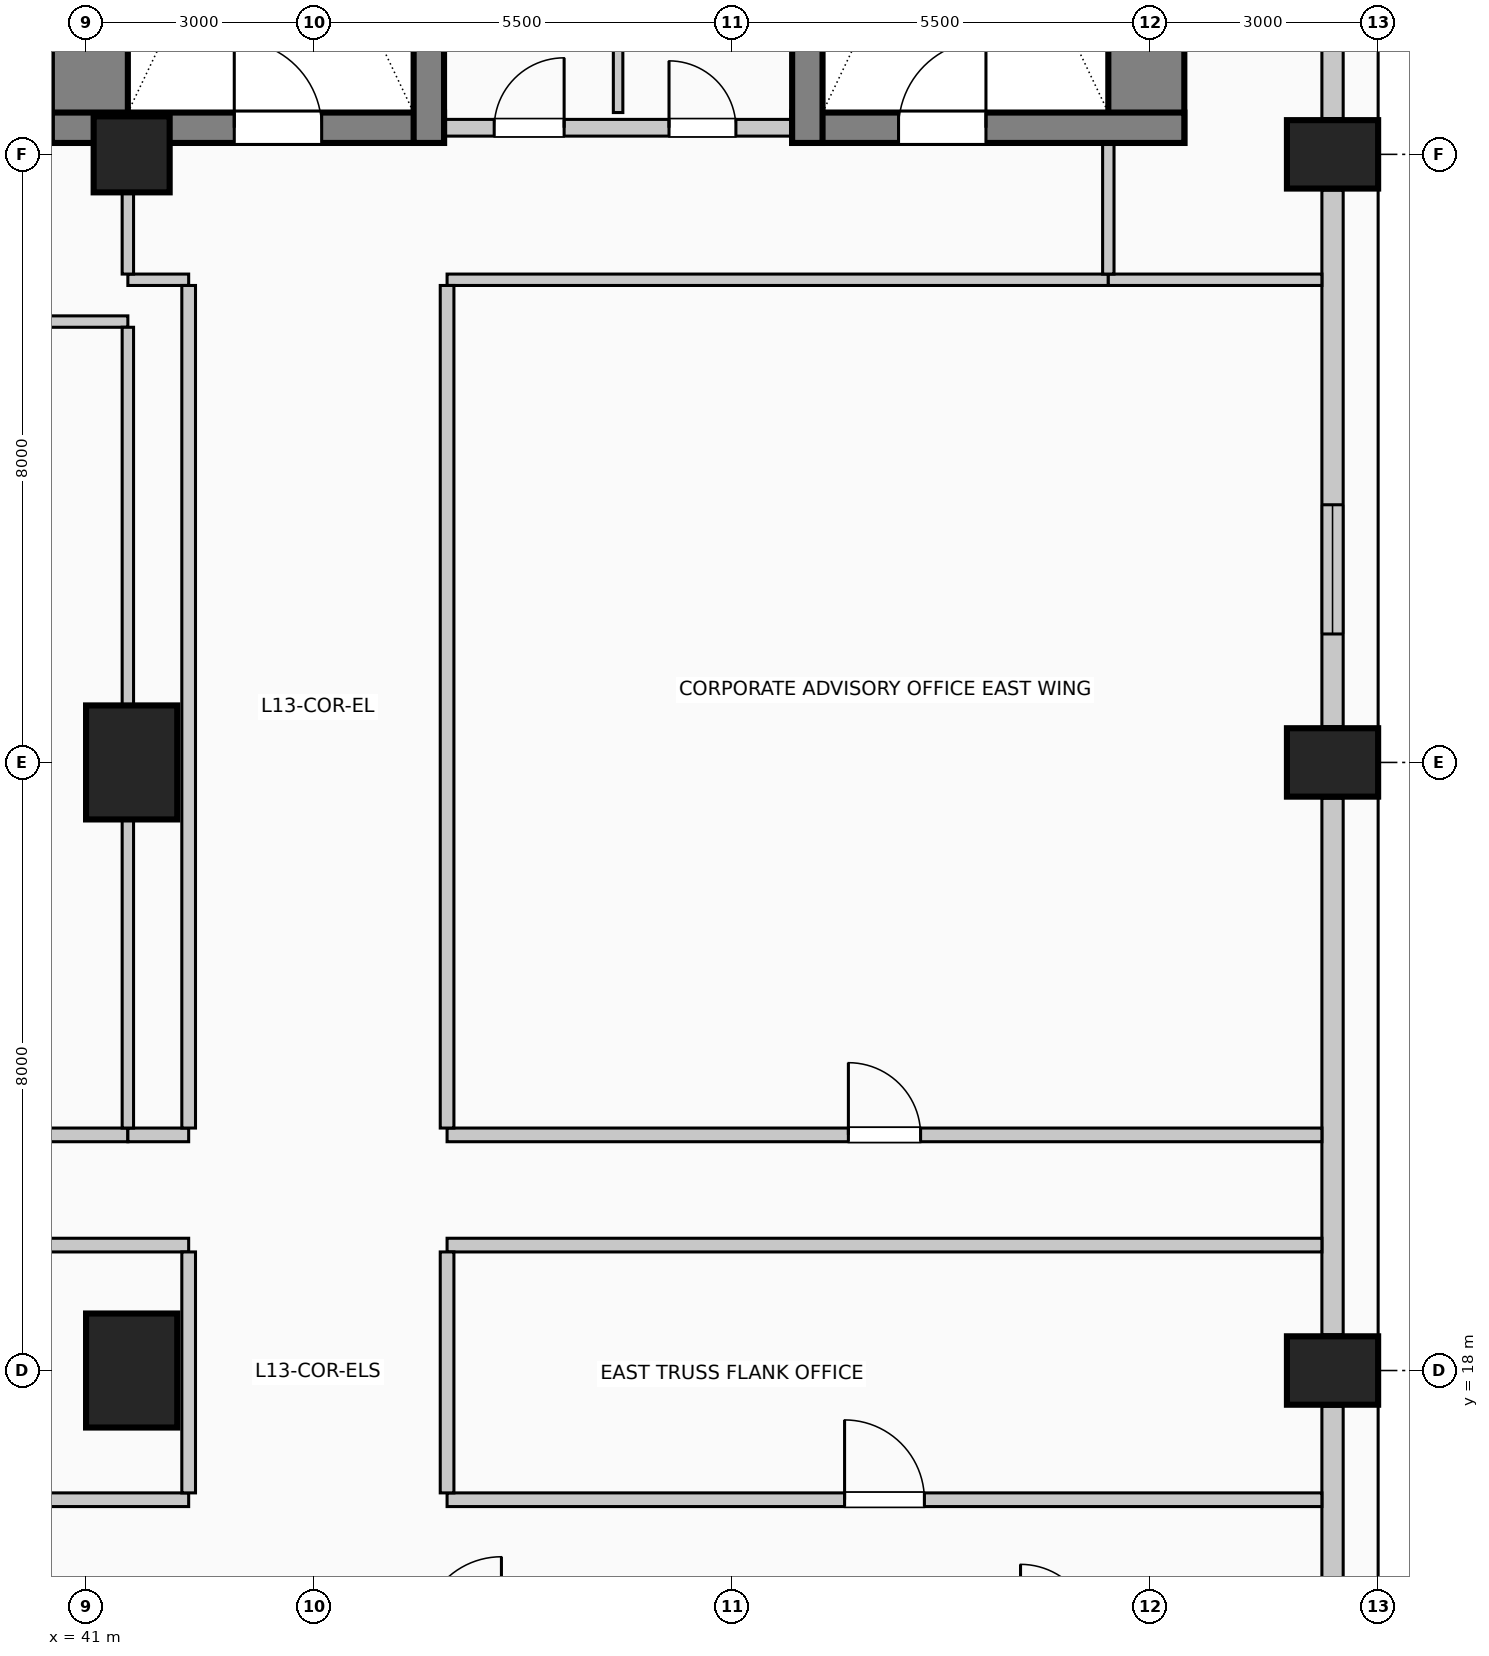
"""IFC4 building model, lengths in metres.
Left out: names, types, materials, properties, quantities, classifications, styles, units other than length and angle.
Written with IfcOpenShell. Run it as: python <this file> out.ifc"""

import sys

from ifc_helpers import new_model, si_unit, direction, frame, frame_2d, origin, origin_2d, place, context, subcontext, project, spatial, rectangle, circle, extrude, element, fill, save


model = new_model("IFC4")
c1 = context("Model", 3, precision=1e-05, world=origin(), true_north=direction((0.0, 1.0)))
c2 = subcontext(c1, "Body", "Model", "MODEL_VIEW")
j1 = project(units=[si_unit("LENGTHUNIT", "METRE"), si_unit("PLANEANGLEUNIT", "RADIAN")], contexts=[c1])
p1 = place(None, origin())
s1 = spatial("IfcSite", under=j1, at=p1, CompositionType="ELEMENT")
p2 = place(p1, origin())
s2 = spatial("IfcBuilding", under=s1, at=p2, CompositionType="ELEMENT")
p3 = place(p2, frame((0.0, 0.0, 54.6)))
s3 = spatial("IfcBuildingStorey", under=s2, at=p3, CompositionType="ELEMENT", Elevation=54.6)
for number, where, z_axis, x_axis in (
    (1, (41.05, 34.15, 0.0), (0.0, 0.0, 1.0), (0.0, 1.0, 0.0)),
    (2, (54.95, 34.15, 0.0), (0.0, 0.0, 1.0), (0.0, 1.0, 0.0)),
):
    element("IfcWall", number, at=place(p3, frame(where, z_axis=z_axis, x_axis=x_axis)), inside=s3, PredefinedType="SHEAR", context=c2, shape_type="SweptSolid", body=[
        extrude(rectangle(XDim=9.28, YDim=1.0, at=frame_2d((4.64, 0.0))), origin(), (0.0, 0.0, 1.0), 4.0),
    ])
p4 = place(p3, frame((40.55, 34.35, 0.0), z_axis=(0.0, 0.0, 1.0), x_axis=(1.0, 0.0, 0.0)))
e3 = element("IfcWall", 3, at=p4, inside=s3, PredefinedType="SHEAR", context=c2, shape_type="SweptSolid", body=[
    extrude(rectangle(XDim=5.16, YDim=0.4, at=frame_2d((2.58, 0.0))), origin(), (0.0, 0.0, 1.0), 4.0),
])
p5 = place(p4, frame((2.4, 0.0, 0.0)))
e4 = element("IfcOpeningElement", 4, at=p5, cuts=e3, PredefinedType="OPENING", context=c2, shape_type="SweptSolid", body=[
    extrude(rectangle(XDim=1.15, YDim=2.2, at=frame_2d((0.575, 1.1))), frame((0.0, 0.21, 0.0), z_axis=(0.0, -1.0, 0.0), x_axis=(1.0, 0.0, 0.0)), (0.0, 0.0, 1.0), 0.42),
])
p6 = place(p3, frame((45.51, 34.15, 0.0), z_axis=(0.0, 0.0, 1.0), x_axis=(0.0, 1.0, 0.0)))
e5 = element("IfcWall", 5, at=p6, inside=s3, PredefinedType="SHEAR", context=c2, shape_type="SweptSolid", body=[
    extrude(rectangle(XDim=9.28, YDim=0.4, at=frame_2d((4.64, 0.0))), origin(), (0.0, 0.0, 1.0), 4.0),
])
p7 = place(p3, frame((50.29, 34.35, 0.0), z_axis=(0.0, 0.0, 1.0), x_axis=(1.0, 0.0, 0.0)))
e6 = element("IfcWall", 6, at=p7, inside=s3, PredefinedType="SHEAR", context=c2, shape_type="SweptSolid", body=[
    extrude(rectangle(XDim=5.16, YDim=0.4, at=frame_2d((2.58, 0.0))), origin(), (0.0, 0.0, 1.0), 4.0),
])
p8 = place(p7, frame((1.4, 0.0, 0.0)))
e7 = element("IfcOpeningElement", 7, at=p8, cuts=e6, PredefinedType="OPENING", context=c2, shape_type="SweptSolid", body=[
    extrude(rectangle(XDim=1.15, YDim=2.2, at=frame_2d((0.575, 1.1))), frame((0.0, 0.21, 0.0), z_axis=(0.0, -1.0, 0.0), x_axis=(1.0, 0.0, 0.0)), (0.0, 0.0, 1.0), 0.42),
])
p9 = place(p3, frame((50.49, 34.15, 0.0), z_axis=(0.0, 0.0, 1.0), x_axis=(0.0, 1.0, 0.0)))
e8 = element("IfcWall", 8, at=p9, inside=s3, PredefinedType="SHEAR", context=c2, shape_type="SweptSolid", body=[
    extrude(rectangle(XDim=9.28, YDim=0.4, at=frame_2d((4.64, 0.0))), origin(), (0.0, 0.0, 1.0), 4.0),
])
for number, where, z_axis, x_axis in (
    (9, (57.4, 18.0, 0.0), (0.0, 0.0, 1.0), (0.0, 1.0, 0.0)),
    (10, (57.4, 26.0, 0.0), (0.0, 0.0, 1.0), (0.0, 1.0, 0.0)),
    (11, (57.4, 34.0, 0.0), (0.0, 0.0, 1.0), (0.0, 1.0, 0.0)),
):
    element("IfcColumn", number, at=place(p3, frame(where, z_axis=z_axis, x_axis=x_axis)), inside=s3, PredefinedType="COLUMN", context=c2, shape_type="SweptSolid", body=[
        extrude(rectangle(XDim=0.9, YDim=1.2, at=origin_2d()), origin(), (0.0, 0.0, 1.0), 4.0),
    ])
for number, where, z_axis, x_axis in (
    (12, (41.6, 18.0, 0.0), (0.0, 0.0, 1.0), (1.0, 0.0, 0.0)),
    (13, (41.6, 26.0, 0.0), (0.0, 0.0, 1.0), (1.0, 0.0, 0.0)),
):
    element("IfcColumn", number, at=place(p3, frame(where, z_axis=z_axis, x_axis=x_axis)), inside=s3, PredefinedType="COLUMN", context=c2, shape_type="SweptSolid", body=[
        extrude(rectangle(XDim=1.2, YDim=1.5, at=origin_2d()), origin(), (0.0, 0.0, 1.0), 4.0),
    ])
p10 = place(p3, frame((41.6, 34.0, 0.0), z_axis=(0.0, 0.0, 1.0), x_axis=(1.0, 0.0, 0.0)))
e14 = element("IfcColumn", 14, at=p10, inside=s3, PredefinedType="COLUMN", context=c2, shape_type="SweptSolid", body=[
    extrude(circle(Radius=0.5, at=origin_2d()), origin(), (0.0, 0.0, 1.0), 4.0),
])
p11 = place(p3, frame((57.4, 17.53, 0.0), z_axis=(0.0, 0.0, 1.0), x_axis=(0.0, -1.0, 0.0)))
e15 = element("IfcWall", 15, at=p11, inside=s3, PredefinedType="SOLIDWALL", context=c2, shape_type="SweptSolid", body=[
    extrude(rectangle(XDim=7.06, YDim=0.28, at=frame_2d((3.53, 0.0))), origin(), (0.0, 0.0, 1.0), 2.85),
])
p12 = place(p11, frame((4.14, 0.0, 0.5)))
e16 = element("IfcOpeningElement", 16, at=p12, cuts=e15, PredefinedType="OPENING", context=c2, shape_type="SweptSolid", body=[
    extrude(rectangle(XDim=1.7, YDim=1.95, at=frame_2d((0.85, 0.975))), frame((0.0, 0.15, 0.0), z_axis=(0.0, -1.0, 0.0), x_axis=(1.0, 0.0, 0.0)), (0.0, 0.0, 1.0), 0.3),
])
p13 = place(p3, frame((57.4, 25.53, 0.0), z_axis=(0.0, 0.0, 1.0), x_axis=(0.0, -1.0, 0.0)))
e17 = element("IfcWall", 17, at=p13, inside=s3, PredefinedType="SOLIDWALL", context=c2, shape_type="SweptSolid", body=[
    extrude(rectangle(XDim=7.06, YDim=0.28, at=frame_2d((3.53, 0.0))), origin(), (0.0, 0.0, 1.0), 2.85),
])
p14 = place(p3, frame((57.4, 33.53, 0.0), z_axis=(0.0, 0.0, 1.0), x_axis=(0.0, -1.0, 0.0)))
e18 = element("IfcWall", 18, at=p14, inside=s3, PredefinedType="SOLIDWALL", context=c2, shape_type="SweptSolid", body=[
    extrude(rectangle(XDim=7.06, YDim=0.28, at=frame_2d((3.53, 0.0))), origin(), (0.0, 0.0, 1.0), 2.85),
])
p15 = place(p14, frame((4.14, 0.0, 0.5)))
e19 = element("IfcOpeningElement", 19, at=p15, cuts=e18, PredefinedType="OPENING", context=c2, shape_type="SweptSolid", body=[
    extrude(rectangle(XDim=1.7, YDim=1.95, at=frame_2d((0.85, 0.975))), frame((0.0, 0.15, 0.0), z_axis=(0.0, -1.0, 0.0), x_axis=(1.0, 0.0, 0.0)), (0.0, 0.0, 1.0), 0.3),
])
p16 = place(p3, frame((57.4, 41.93, 0.0), z_axis=(0.0, 0.0, 1.0), x_axis=(0.0, -1.0, 0.0)))
e20 = element("IfcWall", 20, at=p16, inside=s3, PredefinedType="SOLIDWALL", context=c2, shape_type="SweptSolid", body=[
    extrude(rectangle(XDim=7.46, YDim=0.28, at=frame_2d((3.73, 0.0))), origin(), (0.0, 0.0, 1.0), 2.85),
])
p17 = place(p3, frame((45.72, 34.35, 0.0), z_axis=(0.0, 0.0, 1.0), x_axis=(1.0, 0.0, 0.0)))
e21 = element("IfcWall", 21, at=p17, inside=s3, PredefinedType="PARTITIONING", context=c2, shape_type="SweptSolid", body=[
    extrude(rectangle(XDim=4.56, YDim=0.22, at=frame_2d((2.28, 0.0))), origin(), (0.0, 0.0, 1.0), 3.7),
])
p18 = place(p17, frame((0.65, 0.0, 0.0)))
e22 = element("IfcOpeningElement", 22, at=p18, cuts=e21, PredefinedType="OPENING", context=c2, shape_type="SweptSolid", body=[
    extrude(rectangle(XDim=0.92, YDim=2.1, at=frame_2d((0.46, 1.05))), frame((0.0, 0.12, 0.0), z_axis=(0.0, -1.0, 0.0), x_axis=(1.0, 0.0, 0.0)), (0.0, 0.0, 1.0), 0.24),
])
p19 = place(p17, frame((2.95, 0.0, 0.0)))
e23 = element("IfcOpeningElement", 23, at=p19, cuts=e21, PredefinedType="OPENING", context=c2, shape_type="SweptSolid", body=[
    extrude(rectangle(XDim=0.88, YDim=2.1, at=frame_2d((0.44, 1.05))), frame((0.0, 0.12, 0.0), z_axis=(0.0, -1.0, 0.0), x_axis=(1.0, 0.0, 0.0)), (0.0, 0.0, 1.0), 0.24),
])
p20 = place(p3, frame((15.65, 16.3, 0.0), z_axis=(0.0, 0.0, 1.0), x_axis=(1.0, 0.0, 0.0)))
e24 = element("IfcWall", 24, at=p20, inside=s3, PredefinedType="PARTITIONING", context=c2, shape_type="SweptSolid", body=[
    extrude(rectangle(XDim=26.7, YDim=0.18, at=frame_2d((13.35, 0.0))), origin(), (0.0, 0.0, 1.0), 3.7),
])
p21 = place(p3, frame((45.75, 16.3, 0.0), z_axis=(0.0, 0.0, 1.0), x_axis=(1.0, 0.0, 0.0)))
e25 = element("IfcWall", 25, at=p21, inside=s3, PredefinedType="PARTITIONING", context=c2, shape_type="SweptSolid", body=[
    extrude(rectangle(XDim=11.51, YDim=0.18, at=frame_2d((5.755, 0.0))), origin(), (0.0, 0.0, 1.0), 3.7),
])
p22 = place(p21, frame((5.23, 0.0, 0.0)))
e26 = element("IfcOpeningElement", 26, at=p22, cuts=e25, PredefinedType="OPENING", context=c2, shape_type="SweptSolid", body=[
    extrude(rectangle(XDim=1.05, YDim=2.15, at=frame_2d((0.525, 1.075))), frame((0.0, 0.1, 0.0), z_axis=(0.0, -1.0, 0.0), x_axis=(1.0, 0.0, 0.0)), (0.0, 0.0, 1.0), 0.2),
])
p23 = place(p3, frame((15.65, 19.65, 0.0), z_axis=(0.0, 0.0, 1.0), x_axis=(1.0, 0.0, 0.0)))
e27 = element("IfcWall", 27, at=p23, inside=s3, PredefinedType="PARTITIONING", context=c2, shape_type="SweptSolid", body=[
    extrude(rectangle(XDim=26.7, YDim=0.18, at=frame_2d((13.35, 0.0))), origin(), (0.0, 0.0, 1.0), 3.7),
])
p24 = place(p3, frame((45.75, 19.65, 0.0), z_axis=(0.0, 0.0, 1.0), x_axis=(1.0, 0.0, 0.0)))
e28 = element("IfcWall", 28, at=p24, inside=s3, PredefinedType="PARTITIONING", context=c2, shape_type="SweptSolid", body=[
    extrude(rectangle(XDim=11.51, YDim=0.18, at=frame_2d((5.755, 0.0))), origin(), (0.0, 0.0, 1.0), 3.7),
])
p25 = place(p3, frame((20.3, 21.1, 0.0), z_axis=(0.0, 0.0, 1.0), x_axis=(1.0, 0.0, 0.0)))
e29 = element("IfcWall", 29, at=p25, inside=s3, PredefinedType="PARTITIONING", context=c2, shape_type="SweptSolid", body=[
    extrude(rectangle(XDim=21.25, YDim=0.18, at=frame_2d((10.625, 0.0))), origin(), (0.0, 0.0, 1.0), 3.7),
])
p26 = place(p25, frame((10.15, 0.0, 0.0)))
e30 = element("IfcOpeningElement", 30, at=p26, cuts=e29, PredefinedType="OPENING", context=c2, shape_type="SweptSolid", body=[
    extrude(rectangle(XDim=0.95, YDim=2.15, at=frame_2d((0.475, 1.075))), frame((0.0, 0.1, 0.0), z_axis=(0.0, -1.0, 0.0), x_axis=(1.0, 0.0, 0.0)), (0.0, 0.0, 1.0), 0.2),
])
p27 = place(p3, frame((41.55, 21.1, 0.0), z_axis=(0.0, 0.0, 1.0), x_axis=(1.0, 0.0, 0.0)))
e31 = element("IfcWall", 31, at=p27, inside=s3, PredefinedType="PARTITIONING", context=c2, shape_type="SweptSolid", body=[
    extrude(rectangle(XDim=0.8, YDim=0.18, at=frame_2d((0.4, 0.0))), origin(), (0.0, 0.0, 1.0), 3.7),
])
p28 = place(p3, frame((45.75, 21.1, 0.0), z_axis=(0.0, 0.0, 1.0), x_axis=(1.0, 0.0, 0.0)))
e32 = element("IfcWall", 32, at=p28, inside=s3, PredefinedType="PARTITIONING", context=c2, shape_type="SweptSolid", body=[
    extrude(rectangle(XDim=11.51, YDim=0.18, at=frame_2d((5.755, 0.0))), origin(), (0.0, 0.0, 1.0), 3.7),
])
p29 = place(p28, frame((5.28, 0.0, 0.0)))
e33 = element("IfcOpeningElement", 33, at=p29, cuts=e32, PredefinedType="OPENING", context=c2, shape_type="SweptSolid", body=[
    extrude(rectangle(XDim=0.95, YDim=2.15, at=frame_2d((0.475, 1.075))), frame((0.0, 0.1, 0.0), z_axis=(0.0, -1.0, 0.0), x_axis=(1.0, 0.0, 0.0)), (0.0, 0.0, 1.0), 0.2),
])
p30 = place(p3, frame((20.3, 31.8, 0.0), z_axis=(0.0, 0.0, 1.0), x_axis=(1.0, 0.0, 0.0)))
e34 = element("IfcWall", 34, at=p30, inside=s3, PredefinedType="PARTITIONING", context=c2, shape_type="SweptSolid", body=[
    extrude(rectangle(XDim=21.25, YDim=0.15, at=frame_2d((10.625, 0.0))), origin(), (0.0, 0.0, 1.0), 3.7),
])
p31 = place(p3, frame((41.55, 32.35, 0.0), z_axis=(0.0, 0.0, 1.0), x_axis=(1.0, 0.0, 0.0)))
e35 = element("IfcWall", 35, at=p31, inside=s3, PredefinedType="PARTITIONING", context=c2, shape_type="SweptSolid", body=[
    extrude(rectangle(XDim=0.8, YDim=0.15, at=frame_2d((0.4, 0.0))), origin(), (0.0, 0.0, 1.0), 3.7),
])
p32 = place(p3, frame((45.75, 32.35, 0.0), z_axis=(0.0, 0.0, 1.0), x_axis=(1.0, 0.0, 0.0)))
e36 = element("IfcWall", 36, at=p32, inside=s3, PredefinedType="PARTITIONING", context=c2, shape_type="SweptSolid", body=[
    extrude(rectangle(XDim=8.7, YDim=0.15, at=frame_2d((4.35, 0.0))), origin(), (0.0, 0.0, 1.0), 3.7),
])
p33 = place(p3, frame((54.45, 32.35, 0.0), z_axis=(0.0, 0.0, 1.0), x_axis=(1.0, 0.0, 0.0)))
e37 = element("IfcWall", 37, at=p33, inside=s3, PredefinedType="PARTITIONING", context=c2, shape_type="SweptSolid", body=[
    extrude(rectangle(XDim=2.81, YDim=0.15, at=frame_2d((1.405, 0.0))), origin(), (0.0, 0.0, 1.0), 3.7),
])
p34 = place(p3, frame((41.55, 21.19, 0.0), z_axis=(0.0, 0.0, 1.0), x_axis=(0.0, 1.0, 0.0)))
e38 = element("IfcWall", 38, at=p34, inside=s3, PredefinedType="PARTITIONING", context=c2, shape_type="SweptSolid", body=[
    extrude(rectangle(XDim=4.06, YDim=0.15, at=frame_2d((2.03, 0.0))), origin(), (0.0, 0.0, 1.0), 2.995),
])
p35 = place(p3, frame((41.55, 26.75, 0.0), z_axis=(0.0, 0.0, 1.0), x_axis=(0.0, 1.0, 0.0)))
e39 = element("IfcWall", 39, at=p35, inside=s3, PredefinedType="PARTITIONING", context=c2, shape_type="SweptSolid", body=[
    extrude(rectangle(XDim=4.975, YDim=0.15, at=frame_2d((2.488, 0.0))), origin(), (0.0, 0.0, 1.0), 2.995),
])
p36 = place(p3, frame((41.55, 32.425, 0.0), z_axis=(0.0, 0.0, 1.0), x_axis=(0.0, 1.0, 0.0)))
e40 = element("IfcWall", 40, at=p36, inside=s3, PredefinedType="PARTITIONING", context=c2, shape_type="SweptSolid", body=[
    extrude(rectangle(XDim=1.075, YDim=0.15, at=frame_2d((0.538, 0.0))), origin(), (0.0, 0.0, 1.0), 2.995),
])
p37 = place(p3, frame((42.35, 16.39, 0.0), z_axis=(0.0, 0.0, 1.0), x_axis=(0.0, 1.0, 0.0)))
e41 = element("IfcWall", 41, at=p37, inside=s3, PredefinedType="PARTITIONING", context=c2, shape_type="SweptSolid", body=[
    extrude(rectangle(XDim=3.17, YDim=0.18, at=frame_2d((1.585, 0.0))), origin(), (0.0, 0.0, 1.0), 3.7),
])
p38 = place(p3, frame((42.35, 21.19, 0.0), z_axis=(0.0, 0.0, 1.0), x_axis=(0.0, 1.0, 0.0)))
e42 = element("IfcWall", 42, at=p38, inside=s3, PredefinedType="PARTITIONING", context=c2, shape_type="SweptSolid", body=[
    extrude(rectangle(XDim=11.085, YDim=0.18, at=frame_2d((5.542, 0.0))), origin(), (0.0, 0.0, 1.0), 3.7),
])
p39 = place(p3, frame((45.75, 16.39, 0.0), z_axis=(0.0, 0.0, 1.0), x_axis=(0.0, 1.0, 0.0)))
e43 = element("IfcWall", 43, at=p39, inside=s3, PredefinedType="PARTITIONING", context=c2, shape_type="SweptSolid", body=[
    extrude(rectangle(XDim=3.17, YDim=0.18, at=frame_2d((1.585, 0.0))), origin(), (0.0, 0.0, 1.0), 3.7),
])
p40 = place(p3, frame((45.75, 21.19, 0.0), z_axis=(0.0, 0.0, 1.0), x_axis=(0.0, 1.0, 0.0)))
e44 = element("IfcWall", 44, at=p40, inside=s3, PredefinedType="PARTITIONING", context=c2, shape_type="SweptSolid", body=[
    extrude(rectangle(XDim=11.085, YDim=0.18, at=frame_2d((5.542, 0.0))), origin(), (0.0, 0.0, 1.0), 3.7),
])
p41 = place(p3, frame((48.0, 34.55, 0.0), z_axis=(0.0, 0.0, 1.0), x_axis=(0.0, 1.0, 0.0)))
e45 = element("IfcWall", 45, at=p41, inside=s3, PredefinedType="PARTITIONING", context=c2, shape_type="SweptSolid", body=[
    extrude(rectangle(XDim=7.475, YDim=0.125, at=frame_2d((3.737, 0.0))), origin(), (0.0, 0.0, 1.0), 3.7),
])
p42 = place(p3, frame((54.45, 32.425, 0.0), z_axis=(0.0, 0.0, 1.0), x_axis=(0.0, 1.0, 0.0)))
e46 = element("IfcWall", 46, at=p42, inside=s3, PredefinedType="PARTITIONING", context=c2, shape_type="SweptSolid", body=[
    extrude(rectangle(XDim=1.725, YDim=0.15, at=frame_2d((0.862, 0.0))), origin(), (0.0, 0.0, 1.0), 3.7),
])
p43 = place(p15, origin())
e47 = element("IfcWindow", 47, at=p43, inside=s3, PartitioningType="SINGLE_PANEL", PredefinedType="WINDOW", context=c2, shape_type="SweptSolid", body=[
    extrude(rectangle(XDim=1.7, YDim=1.95, at=frame_2d((0.85, 0.975))), frame((0.0, 0.03, 0.0), z_axis=(0.0, -1.0, 0.0), x_axis=(1.0, 0.0, 0.0)), (0.0, 0.0, 1.0), 0.06),
])
fill(e19, e47)
p44 = place(p5, origin())
e48 = element("IfcDoor", 48, at=p44, inside=s3, OperationType="SINGLE_SWING_LEFT", PredefinedType="DOOR", context=c2, shape_type="SweptSolid", body=[
    extrude(rectangle(XDim=1.15, YDim=2.2, at=frame_2d((0.575, 1.1))), frame((0.0, 0.025, 0.0), z_axis=(0.0, -1.0, 0.0), x_axis=(1.0, 0.0, 0.0)), (0.0, 0.0, 1.0), 0.05),
])
fill(e4, e48)
p45 = place(p18, origin())
e49 = element("IfcDoor", 49, at=p45, inside=s3, OperationType="SINGLE_SWING_RIGHT", PredefinedType="DOOR", context=c2, shape_type="SweptSolid", body=[
    extrude(rectangle(XDim=0.92, YDim=2.1, at=frame_2d((0.46, 1.05))), frame((0.0, 0.025, 0.0), z_axis=(0.0, -1.0, 0.0), x_axis=(1.0, 0.0, 0.0)), (0.0, 0.0, 1.0), 0.05),
])
fill(e22, e49)
p46 = place(p19, origin())
e50 = element("IfcDoor", 50, at=p46, inside=s3, OperationType="SINGLE_SWING_LEFT", PredefinedType="DOOR", context=c2, shape_type="SweptSolid", body=[
    extrude(rectangle(XDim=0.88, YDim=2.1, at=frame_2d((0.44, 1.05))), frame((0.0, 0.025, 0.0), z_axis=(0.0, -1.0, 0.0), x_axis=(1.0, 0.0, 0.0)), (0.0, 0.0, 1.0), 0.05),
])
fill(e23, e50)
p47 = place(p8, origin())
e51 = element("IfcDoor", 51, at=p47, inside=s3, OperationType="SINGLE_SWING_RIGHT", PredefinedType="DOOR", context=c2, shape_type="SweptSolid", body=[
    extrude(rectangle(XDim=1.15, YDim=2.2, at=frame_2d((0.575, 1.1))), frame((0.0, 0.025, 0.0), z_axis=(0.0, -1.0, 0.0), x_axis=(1.0, 0.0, 0.0)), (0.0, 0.0, 1.0), 0.05),
])
fill(e7, e51)
p48 = place(p22, origin())
e52 = element("IfcDoor", 52, at=p48, inside=s3, OperationType="SINGLE_SWING_LEFT", PredefinedType="DOOR", context=c2, shape_type="SweptSolid", body=[
    extrude(rectangle(XDim=1.05, YDim=2.15, at=frame_2d((0.525, 1.075))), frame((0.0, 0.025, 0.0), z_axis=(0.0, -1.0, 0.0), x_axis=(1.0, 0.0, 0.0)), (0.0, 0.0, 1.0), 0.05),
])
fill(e26, e52)
p49 = place(p29, origin())
e53 = element("IfcDoor", 53, at=p49, inside=s3, OperationType="SINGLE_SWING_LEFT", PredefinedType="DOOR", context=c2, shape_type="SweptSolid", body=[
    extrude(rectangle(XDim=0.95, YDim=2.15, at=frame_2d((0.475, 1.075))), frame((0.0, 0.025, 0.0), z_axis=(0.0, -1.0, 0.0), x_axis=(1.0, 0.0, 0.0)), (0.0, 0.0, 1.0), 0.05),
])
fill(e33, e53)
save(model, sys.argv[1])
